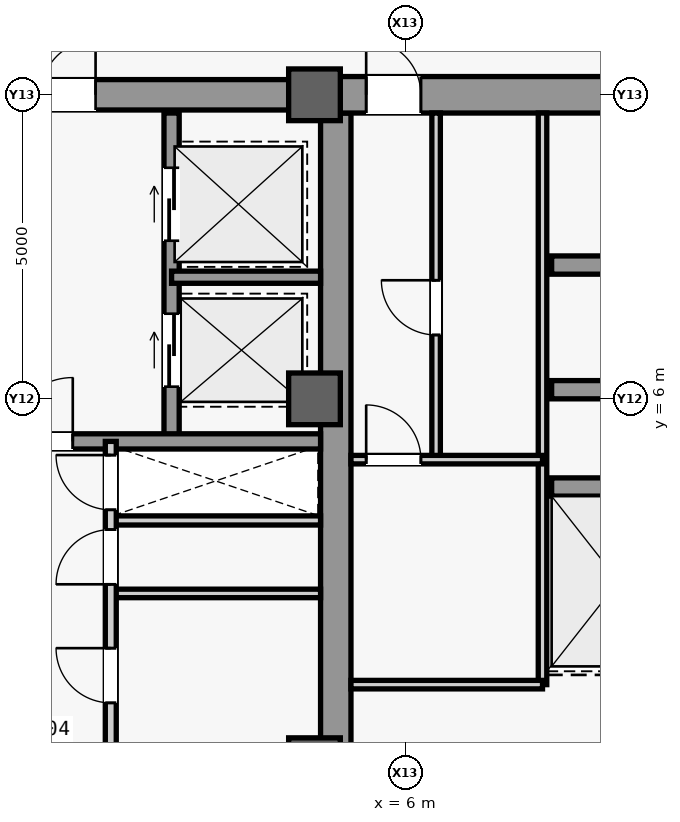
"""IFC4 building model, lengths in metres.
Left out: names, types, materials, properties, quantities, classifications, styles, units other than length and angle.
Written with IfcOpenShell. Run it as: python <this file> out.ifc"""

import sys

from ifc_helpers import new_model, si_unit, direction, frame, frame_2d, origin, origin_2d, place, context, subcontext, project, spatial, rectangle, extrude, source, transform, mapped, element, fill, save


model = new_model("IFC4")
c1 = context("Model", 3, precision=1e-05, world=origin(), true_north=direction((0.0, 1.0)))
c2 = subcontext(c1, "Body", "Model", "MODEL_VIEW")
j1 = project(units=[si_unit("LENGTHUNIT", "METRE"), si_unit("PLANEANGLEUNIT", "RADIAN")], contexts=[c1])
p1 = place(None, origin())
s1 = spatial("IfcSite", under=j1, at=p1, CompositionType="ELEMENT")
p2 = place(p1, origin())
s2 = spatial("IfcBuilding", under=s1, at=p2, CompositionType="ELEMENT")
p3 = place(p2, frame((0.0, 0.0, 247.1)))
s3 = spatial("IfcBuildingStorey", under=s2, at=p3, CompositionType="ELEMENT", Elevation=247.1)
m1 = source(origin(), c2, "Body", "SweptSolid", [
    extrude(rectangle(XDim=21.4, YDim=0.5, at=frame_2d((10.7, 0.0))), origin(), (0.0, 0.0, 1.0), 3.78),
])
p4 = place(p3, frame((4.85, -10.7, 0.0), z_axis=(0.0, 0.0, 1.0), x_axis=(0.0, 1.0, 0.0)))
e1 = element("IfcWall", 1, at=p4, inside=s3, PredefinedType="SHEAR", context=c2, shape_type="MappedRepresentation", body=[
    mapped(m1, transform((0.0, 0.0, 0.0), scale=1.0)),
])
m2 = source(origin(), c2, "Body", "SweptSolid", [
    extrude(rectangle(XDim=5.9, YDim=0.6, at=frame_2d((2.95, 0.0))), origin(), (0.0, 0.0, 1.0), 3.78),
])
p5 = place(p3, frame((4.85, 11.0, 0.0), z_axis=(0.0, 0.0, 1.0), x_axis=(1.0, 0.0, 0.0)))
e2 = element("IfcWall", 2, at=p5, inside=s3, PredefinedType="SHEAR", context=c2, shape_type="MappedRepresentation", body=[
    mapped(m2, transform((0.0, 0.0, 0.0), scale=1.0)),
])
m3 = source(origin(), c2, "Body", "SweptSolid", [
    extrude(rectangle(XDim=0.9, YDim=2.15, at=frame_2d((0.45, 1.075))), frame((0.0, 0.31, 0.0), z_axis=(0.0, -1.0, 0.0), x_axis=(1.0, 0.0, 0.0)), (0.0, 0.0, 1.0), 0.62),
])
p6 = place(p5, frame((0.5, 0.0, 0.0)))
e3 = element("IfcOpeningElement", 3, at=p6, cuts=e2, PredefinedType="OPENING", context=c2, shape_type="MappedRepresentation", body=[
    mapped(m3, transform((0.0, 0.0, 0.0), scale=1.0)),
])
m4 = source(origin(), c2, "Body", "SweptSolid", [
    extrude(rectangle(XDim=9.2, YDim=0.5, at=frame_2d((4.6, 0.0))), origin(), (0.0, 0.0, 1.0), 3.78),
])
p7 = place(p3, frame((-4.6, 11.0, 0.0), z_axis=(0.0, 0.0, 1.0), x_axis=(1.0, 0.0, 0.0)))
e4 = element("IfcWall", 4, at=p7, inside=s3, PredefinedType="SHEAR", context=c2, shape_type="MappedRepresentation", body=[
    mapped(m4, transform((0.0, 0.0, 0.0), scale=1.0)),
])
m5 = source(origin(), c2, "Body", "SweptSolid", [
    extrude(rectangle(XDim=1.8, YDim=2.25, at=frame_2d((0.9, 1.125))), frame((0.0, 0.26, 0.0), z_axis=(0.0, -1.0, 0.0), x_axis=(1.0, 0.0, 0.0)), (0.0, 0.0, 1.0), 0.52),
])
p8 = place(p7, frame((3.7, 0.0, 0.0)))
e5 = element("IfcOpeningElement", 5, at=p8, cuts=e4, PredefinedType="OPENING", context=c2, shape_type="MappedRepresentation", body=[
    mapped(m5, transform((0.0, 0.0, 0.0), scale=1.0)),
])
m6 = source(origin(), c2, "Body", "SweptSolid", [
    extrude(rectangle(XDim=0.85, YDim=0.85, at=origin_2d()), origin(), (0.0, 0.0, 1.0), 4.0),
])
for number, where, z_axis, x_axis in (
    (6, (4.5, 0.0, 0.0), (0.0, 0.0, 1.0), (1.0, 0.0, 0.0)),
    (7, (4.5, 6.0, 0.0), (0.0, 0.0, 1.0), (1.0, 0.0, 0.0)),
    (8, (4.5, 11.0, 0.0), (0.0, 0.0, 1.0), (1.0, 0.0, 0.0)),
):
    element("IfcColumn", number, at=place(p3, frame(where, z_axis=z_axis, x_axis=x_axis)), inside=s3, PredefinedType="COLUMN", context=c2, shape_type="MappedRepresentation", body=[
        mapped(m6, transform((0.0, 0.0, 0.0), scale=1.0)),
    ])
m7 = source(origin(), c2, "Body", "SweptSolid", [
    extrude(rectangle(XDim=2.3, YDim=0.3, at=frame_2d((1.15, 0.0))), origin(), (0.0, 0.0, 1.0), 3.78),
])
for number, where, z_axis, x_axis in (
    (9, (8.4, 4.55, 0.0), (0.0, 0.0, 1.0), (1.0, 0.0, 0.0)),
    (10, (8.4, 6.15, 0.0), (0.0, 0.0, 1.0), (1.0, 0.0, 0.0)),
    (11, (8.4, 8.2, 0.0), (0.0, 0.0, 1.0), (1.0, 0.0, 0.0)),
):
    element("IfcWall", number, at=place(p3, frame(where, z_axis=z_axis, x_axis=x_axis)), inside=s3, PredefinedType="SHEAR", context=c2, shape_type="MappedRepresentation", body=[
        mapped(m7, transform((0.0, 0.0, 0.0), scale=1.0)),
    ])
m8 = source(origin(), c2, "Body", "SweptSolid", [
    extrude(rectangle(XDim=9.4, YDim=0.14, at=frame_2d((4.7, 0.0))), origin(), (0.0, 0.0, 1.0), 3.78),
])
p9 = place(p3, frame((8.25, 1.3, 0.0), z_axis=(0.0, 0.0, 1.0), x_axis=(0.0, 1.0, 0.0)))
e12 = element("IfcWall", 12, at=p9, inside=s3, PredefinedType="PARTITIONING", context=c2, shape_type="MappedRepresentation", body=[
    mapped(m8, transform((0.0, 0.0, 0.0), scale=1.0)),
])
m9 = source(origin(), c2, "Body", "SweptSolid", [
    extrude(rectangle(XDim=3.15, YDim=0.14, at=frame_2d((1.575, 0.0))), origin(), (0.0, 0.0, 1.0), 3.78),
])
p10 = place(p3, frame((5.1, 1.3, 0.0), z_axis=(0.0, 0.0, 1.0), x_axis=(1.0, 0.0, 0.0)))
e13 = element("IfcWall", 13, at=p10, inside=s3, PredefinedType="PARTITIONING", context=c2, shape_type="MappedRepresentation", body=[
    mapped(m9, transform((0.0, 0.0, 0.0), scale=1.0)),
])
m10 = source(origin(), c2, "Body", "SweptSolid", [
    extrude(rectangle(XDim=5.7, YDim=0.14, at=frame_2d((2.85, 0.0))), origin(), (0.0, 0.0, 1.0), 3.78),
])
p11 = place(p3, frame((6.5, 5.0, 0.0), z_axis=(0.0, 0.0, 1.0), x_axis=(0.0, 1.0, 0.0)))
e14 = element("IfcWall", 14, at=p11, inside=s3, PredefinedType="PARTITIONING", context=c2, shape_type="MappedRepresentation", body=[
    mapped(m10, transform((0.0, 0.0, 0.0), scale=1.0)),
])
m11 = source(origin(), c2, "Body", "SweptSolid", [
    extrude(rectangle(XDim=0.9, YDim=2.15, at=frame_2d((0.45, 1.075))), frame((0.0, 0.08, 0.0), z_axis=(0.0, -1.0, 0.0), x_axis=(1.0, 0.0, 0.0)), (0.0, 0.0, 1.0), 0.16),
])
p12 = place(p11, frame((2.05, 0.0, 0.0)))
e15 = element("IfcOpeningElement", 15, at=p12, cuts=e14, PredefinedType="OPENING", context=c2, shape_type="MappedRepresentation", body=[
    mapped(m11, transform((0.0, 0.0, 0.0), scale=1.0)),
])
p13 = place(p3, frame((5.1, 5.0, 0.0), z_axis=(0.0, 0.0, 1.0), x_axis=(1.0, 0.0, 0.0)))
e16 = element("IfcWall", 16, at=p13, inside=s3, PredefinedType="PARTITIONING", context=c2, shape_type="MappedRepresentation", body=[
    mapped(m9, transform((0.0, 0.0, 0.0), scale=1.0)),
])
p14 = place(p13, frame((0.25, 0.0, 0.0)))
e17 = element("IfcOpeningElement", 17, at=p14, cuts=e16, PredefinedType="OPENING", context=c2, shape_type="MappedRepresentation", body=[
    mapped(m11, transform((0.0, 0.0, 0.0), scale=1.0)),
])
m12 = source(origin(), c2, "Body", "SweptSolid", [
    extrude(rectangle(XDim=3.45, YDim=0.15, at=frame_2d((1.725, 0.0))), origin(), (0.0, 0.0, 1.0), 3.78),
])
p15 = place(p3, frame((1.15, 4.0, 0.0), z_axis=(0.0, 0.0, 1.0), x_axis=(1.0, 0.0, 0.0)))
e18 = element("IfcWall", 18, at=p15, inside=s3, PredefinedType="PARTITIONING", context=c2, shape_type="MappedRepresentation", body=[
    mapped(m12, transform((0.0, 0.0, 0.0), scale=1.0)),
])
m13 = source(origin(), c2, "Body", "SweptSolid", [
    extrude(rectangle(XDim=5.4, YDim=0.25, at=frame_2d((2.7, 0.0))), origin(), (0.0, 0.0, 1.0), 3.78),
])
p16 = place(p3, frame((2.15, 5.3, 0.0), z_axis=(0.0, 0.0, 1.0), x_axis=(0.0, 1.0, 0.0)))
e19 = element("IfcWall", 19, at=p16, inside=s3, PredefinedType="SHEAR", context=c2, shape_type="MappedRepresentation", body=[
    mapped(m13, transform((0.0, 0.0, 0.0), scale=1.0)),
])
m14 = source(origin(), c2, "Body", "SweptSolid", [
    extrude(rectangle(XDim=1.2, YDim=2.3, at=frame_2d((0.6, 1.15))), frame((0.0, 0.135, 0.0), z_axis=(0.0, -1.0, 0.0), x_axis=(1.0, 0.0, 0.0)), (0.0, 0.0, 1.0), 0.27),
])
p17 = place(p16, frame((3.3, 0.0, 0.0)))
e20 = element("IfcOpeningElement", 20, at=p17, cuts=e19, PredefinedType="OPENING", context=c2, shape_type="MappedRepresentation", body=[
    mapped(m14, transform((0.0, 0.0, 0.0), scale=1.0)),
])
p18 = place(p16, frame((0.9, 0.0, 0.0)))
e21 = element("IfcOpeningElement", 21, at=p18, cuts=e19, PredefinedType="OPENING", context=c2, shape_type="MappedRepresentation", body=[
    mapped(m14, transform((0.0, 0.0, 0.0), scale=1.0)),
])
m15 = source(origin(), c2, "Body", "SweptSolid", [
    extrude(rectangle(XDim=2.45, YDim=0.2, at=frame_2d((1.225, 0.0))), origin(), (0.0, 0.0, 1.0), 3.78),
])
p19 = place(p3, frame((2.15, 8.0, 0.0), z_axis=(0.0, 0.0, 1.0), x_axis=(1.0, 0.0, 0.0)))
e22 = element("IfcWall", 22, at=p19, inside=s3, PredefinedType="SHEAR", context=c2, shape_type="MappedRepresentation", body=[
    mapped(m15, transform((0.0, 0.0, 0.0), scale=1.0)),
])
m16 = source(origin(), c2, "Body", "SweptSolid", [
    extrude(rectangle(XDim=9.2, YDim=0.25, at=frame_2d((4.6, 0.0))), origin(), (0.0, 0.0, 1.0), 3.78),
])
p20 = place(p3, frame((-4.6, 5.3, 0.0), z_axis=(0.0, 0.0, 1.0), x_axis=(1.0, 0.0, 0.0)))
e23 = element("IfcWall", 23, at=p20, inside=s3, PredefinedType="SHEAR", context=c2, shape_type="MappedRepresentation", body=[
    mapped(m16, transform((0.0, 0.0, 0.0), scale=1.0)),
])
m17 = source(origin(), c2, "Body", "SweptSolid", [
    extrude(rectangle(XDim=1.05, YDim=2.2, at=frame_2d((0.525, 1.1))), frame((0.0, 0.135, 0.0), z_axis=(0.0, -1.0, 0.0), x_axis=(1.0, 0.0, 0.0)), (0.0, 0.0, 1.0), 0.27),
])
p21 = place(p20, frame((4.075, 0.0, 0.0)))
e24 = element("IfcOpeningElement", 24, at=p21, cuts=e23, PredefinedType="OPENING", context=c2, shape_type="MappedRepresentation", body=[
    mapped(m17, transform((0.0, 0.0, 0.0), scale=1.0)),
])
m18 = source(origin(), c2, "Body", "SweptSolid", [
    extrude(rectangle(XDim=3.45, YDim=0.14, at=frame_2d((1.725, 0.0))), origin(), (0.0, 0.0, 1.0), 3.78),
])
p22 = place(p3, frame((1.15, 2.8, 0.0), z_axis=(0.0, 0.0, 1.0), x_axis=(1.0, 0.0, 0.0)))
e25 = element("IfcWall", 25, at=p22, inside=s3, PredefinedType="PARTITIONING", context=c2, shape_type="MappedRepresentation", body=[
    mapped(m18, transform((0.0, 0.0, 0.0), scale=1.0)),
])
m19 = source(origin(), c2, "Body", "SweptSolid", [
    extrude(rectangle(XDim=10.6, YDim=0.18, at=frame_2d((5.3, 0.0))), origin(), (0.0, 0.0, 1.0), 3.78),
])
p23 = place(p3, frame((1.15, -5.3, 0.0), z_axis=(0.0, 0.0, 1.0), x_axis=(0.0, 1.0, 0.0)))
e26 = element("IfcWall", 26, at=p23, inside=s3, PredefinedType="PARTITIONING", context=c2, shape_type="MappedRepresentation", body=[
    mapped(m19, transform((0.0, 0.0, 0.0), scale=1.0)),
])
m20 = source(origin(), c2, "Body", "SweptSolid", [
    extrude(rectangle(XDim=0.9, YDim=2.15, at=frame_2d((0.45, 1.075))), frame((0.0, 0.1, 0.0), z_axis=(0.0, -1.0, 0.0), x_axis=(1.0, 0.0, 0.0)), (0.0, 0.0, 1.0), 0.2),
])
p24 = place(p23, frame((0.85, 0.0, 0.0)))
e27 = element("IfcOpeningElement", 27, at=p24, cuts=e26, PredefinedType="OPENING", context=c2, shape_type="MappedRepresentation", body=[
    mapped(m20, transform((0.0, 0.0, 0.0), scale=1.0)),
])
p25 = place(p23, frame((3.55, 0.0, 0.0)))
e28 = element("IfcOpeningElement", 28, at=p25, cuts=e26, PredefinedType="OPENING", context=c2, shape_type="MappedRepresentation", body=[
    mapped(m20, transform((0.0, 0.0, 0.0), scale=1.0)),
])
p26 = place(p23, frame((6.3, 0.0, 0.0)))
e29 = element("IfcOpeningElement", 29, at=p26, cuts=e26, PredefinedType="OPENING", context=c2, shape_type="MappedRepresentation", body=[
    mapped(m20, transform((0.0, 0.0, 0.0), scale=1.0)),
])
p27 = place(p23, frame((8.25, 0.0, 0.0)))
e30 = element("IfcOpeningElement", 30, at=p27, cuts=e26, PredefinedType="OPENING", context=c2, shape_type="MappedRepresentation", body=[
    mapped(m20, transform((0.0, 0.0, 0.0), scale=1.0)),
])
p28 = place(p23, frame((9.475, 0.0, 0.0)))
e31 = element("IfcOpeningElement", 31, at=p28, cuts=e26, PredefinedType="OPENING", context=c2, shape_type="MappedRepresentation", body=[
    mapped(m20, transform((0.0, 0.0, 0.0), scale=1.0)),
])
m21 = source(origin(), c2, "Body", "SweptSolid", [
    extrude(rectangle(XDim=0.9, YDim=2.15, at=frame_2d((0.45, 1.075))), frame((0.0, 0.025, 0.0), z_axis=(0.0, -1.0, 0.0), x_axis=(1.0, 0.0, 0.0)), (0.0, 0.0, 1.0), 0.05),
])
p29 = place(p6, origin())
e32 = element("IfcDoor", 32, at=p29, inside=s3, OperationType="SINGLE_SWING_LEFT", PredefinedType="DOOR", context=c2, shape_type="MappedRepresentation", body=[
    mapped(m21, transform((0.0, 0.0, 0.0), scale=1.0)),
])
fill(e3, e32)
p30 = place(p12, origin())
e33 = element("IfcDoor", 33, at=p30, inside=s3, OperationType="SINGLE_SWING_RIGHT", PredefinedType="DOOR", context=c2, shape_type="MappedRepresentation", body=[
    mapped(m21, transform((0.0, 0.0, 0.0), scale=1.0)),
])
fill(e15, e33)
p31 = place(p14, origin())
e34 = element("IfcDoor", 34, at=p31, inside=s3, OperationType="SINGLE_SWING_LEFT", PredefinedType="DOOR", context=c2, shape_type="MappedRepresentation", body=[
    mapped(m21, transform((0.0, 0.0, 0.0), scale=1.0)),
])
fill(e17, e34)
m22 = source(origin(), c2, "Body", "SweptSolid", [
    extrude(rectangle(XDim=1.05, YDim=2.2, at=frame_2d((0.525, 1.1))), frame((0.0, 0.025, 0.0), z_axis=(0.0, -1.0, 0.0), x_axis=(1.0, 0.0, 0.0)), (0.0, 0.0, 1.0), 0.05),
])
p32 = place(p21, origin())
e35 = element("IfcDoor", 35, at=p32, inside=s3, OperationType="SINGLE_SWING_RIGHT", PredefinedType="DOOR", context=c2, shape_type="MappedRepresentation", body=[
    mapped(m22, transform((0.0, 0.0, 0.0), scale=1.0)),
])
fill(e24, e35)
m23 = source(origin(), c2, "Body", "SweptSolid", [
    extrude(rectangle(XDim=1.8, YDim=2.25, at=frame_2d((0.9, 1.125))), frame((0.0, 0.025, 0.0), z_axis=(0.0, -1.0, 0.0), x_axis=(1.0, 0.0, 0.0)), (0.0, 0.0, 1.0), 0.05),
])
p33 = place(p8, origin())
e36 = element("IfcDoor", 36, at=p33, inside=s3, OperationType="SINGLE_SWING_RIGHT", PredefinedType="DOOR", context=c2, shape_type="MappedRepresentation", body=[
    mapped(m23, transform((0.0, 0.0, 0.0), scale=1.0)),
])
fill(e5, e36)
p34 = place(p26, origin())
e37 = element("IfcDoor", 37, at=p34, inside=s3, OperationType="SINGLE_SWING_RIGHT", PredefinedType="DOOR", context=c2, shape_type="MappedRepresentation", body=[
    mapped(m21, transform((0.0, 0.0, 0.0), scale=1.0)),
])
fill(e29, e37)
p35 = place(p27, origin())
e38 = element("IfcDoor", 38, at=p35, inside=s3, OperationType="SINGLE_SWING_LEFT", PredefinedType="DOOR", context=c2, shape_type="MappedRepresentation", body=[
    mapped(m21, transform((0.0, 0.0, 0.0), scale=1.0)),
])
fill(e30, e38)
p36 = place(p28, origin())
e39 = element("IfcDoor", 39, at=p36, inside=s3, OperationType="SINGLE_SWING_RIGHT", PredefinedType="DOOR", context=c2, shape_type="MappedRepresentation", body=[
    mapped(m21, transform((0.0, 0.0, 0.0), scale=1.0)),
])
fill(e31, e39)
m24 = source(origin(), c2, "Body", "SweptSolid", [
    extrude(rectangle(XDim=1.2, YDim=2.3, at=frame_2d((0.6, 1.15))), frame((0.0, 0.025, 0.0), z_axis=(0.0, -1.0, 0.0), x_axis=(1.0, 0.0, 0.0)), (0.0, 0.0, 1.0), 0.05),
])
p37 = place(p17, origin())
e40 = element("IfcDoor", 40, at=p37, inside=s3, OperationType="SLIDING_TO_LEFT", PredefinedType="DOOR", context=c2, shape_type="MappedRepresentation", body=[
    mapped(m24, transform((0.0, 0.0, 0.0), scale=1.0)),
])
fill(e20, e40)
p38 = place(p18, origin())
e41 = element("IfcDoor", 41, at=p38, inside=s3, OperationType="SLIDING_TO_LEFT", PredefinedType="DOOR", context=c2, shape_type="MappedRepresentation", body=[
    mapped(m24, transform((0.0, 0.0, 0.0), scale=1.0)),
])
fill(e21, e41)
save(model, sys.argv[1])
